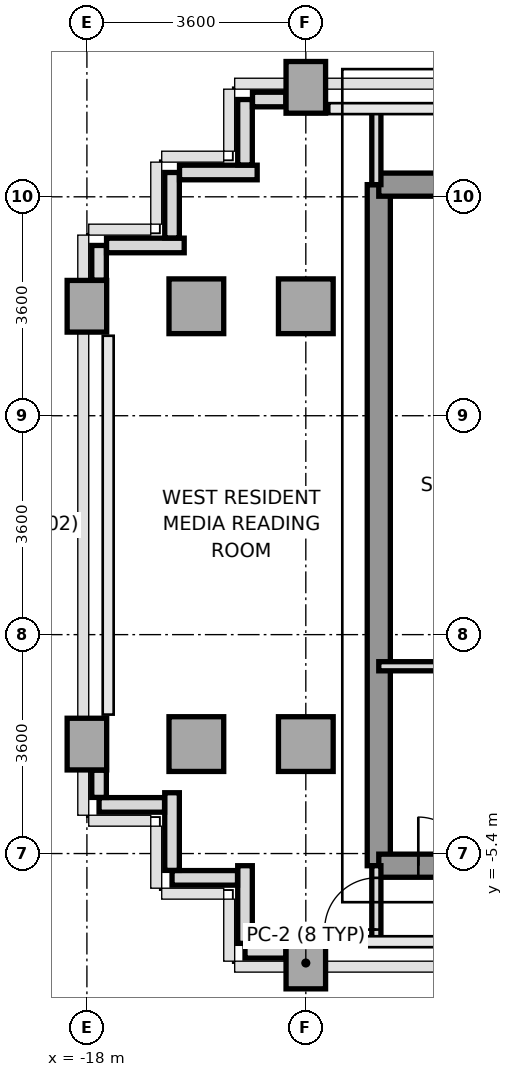
"""IFC4 building model, lengths in metres.
Left out: names, types, materials, properties, quantities, classifications, styles, units other than length and angle.
Written with IfcOpenShell. Run it as: python <this file> out.ifc"""

import sys

from ifc_helpers import new_model, si_unit, direction, frame, frame_2d, origin, origin_2d, place, context, subcontext, project, spatial, rectangle, extrude, source, transform, mapped, element, fill, save


model = new_model("IFC4")
c1 = context("Model", 3, precision=1e-05, world=origin(), true_north=direction((0.0, 1.0)))
c2 = subcontext(c1, "Body", "Model", "MODEL_VIEW")
j1 = project(units=[si_unit("LENGTHUNIT", "METRE"), si_unit("PLANEANGLEUNIT", "RADIAN")], contexts=[c1])
p1 = place(None, origin())
s1 = spatial("IfcSite", under=j1, at=p1, CompositionType="ELEMENT")
p2 = place(p1, origin())
s2 = spatial("IfcBuilding", under=s1, at=p2, CompositionType="ELEMENT")
p3 = place(p2, frame((0.0, 0.0, 208.0)))
s3 = spatial("IfcBuildingStorey", under=s2, at=p3, CompositionType="ELEMENT", Elevation=208.0)
m1 = source(origin(), c2, "Body", "SweptSolid", [
    extrude(rectangle(XDim=0.65, YDim=0.85, at=origin_2d()), origin(), (0.0, 0.0, 1.0), 3.2),
])
for number, where, z_axis, x_axis in (
    (1, (-18.0, -3.6, 0.0), (0.0, 0.0, 1.0), (1.0, 0.0, 0.0)),
    (2, (-18.0, 3.6, 0.0), (0.0, 0.0, 1.0), (1.0, 0.0, 0.0)),
):
    element("IfcColumn", number, at=place(p3, frame(where, z_axis=z_axis, x_axis=x_axis)), inside=s3, PredefinedType="COLUMN", context=c2, shape_type="MappedRepresentation", body=[
        mapped(m1, transform((0.0, 0.0, 0.0), x_axis=(1.0, 0.0, 0.0), y_axis=(0.0, 1.0, 0.0), z_axis=(0.0, 0.0, 1.0), scale=1.0)),
    ])
m2 = source(origin(), c2, "Body", "SweptSolid", [
    extrude(rectangle(XDim=0.9, YDim=0.9, at=origin_2d()), origin(), (0.0, 0.0, 1.0), 3.2),
])
for number, where, z_axis, x_axis in (
    (3, (-16.2, -3.6, 0.0), (0.0, 0.0, 1.0), (1.0, 0.0, 0.0)),
    (4, (-16.2, 3.6, 0.0), (0.0, 0.0, 1.0), (1.0, 0.0, 0.0)),
):
    element("IfcColumn", number, at=place(p3, frame(where, z_axis=z_axis, x_axis=x_axis)), inside=s3, PredefinedType="COLUMN", context=c2, shape_type="MappedRepresentation", body=[
        mapped(m2, transform((0.0, 0.0, 0.0), x_axis=(1.0, 0.0, 0.0), y_axis=(0.0, 1.0, 0.0), z_axis=(0.0, 0.0, 1.0), scale=1.0)),
    ])
p4 = place(p3, frame((-14.4, -7.2, 0.0), z_axis=(0.0, 0.0, 1.0), x_axis=(1.0, 0.0, 0.0)))
e5 = element("IfcColumn", 5, at=p4, inside=s3, PredefinedType="COLUMN", context=c2, shape_type="MappedRepresentation", body=[
    mapped(m1, transform((0.0, 0.0, 0.0), x_axis=(1.0, 0.0, 0.0), y_axis=(0.0, 1.0, 0.0), z_axis=(0.0, 0.0, 1.0), scale=1.0)),
])
for number, where, z_axis, x_axis in (
    (6, (-14.4, -3.6, 0.0), (0.0, 0.0, 1.0), (1.0, 0.0, 0.0)),
    (7, (-14.4, 3.6, 0.0), (0.0, 0.0, 1.0), (1.0, 0.0, 0.0)),
):
    element("IfcColumn", number, at=place(p3, frame(where, z_axis=z_axis, x_axis=x_axis)), inside=s3, PredefinedType="COLUMN", context=c2, shape_type="MappedRepresentation", body=[
        mapped(m2, transform((0.0, 0.0, 0.0), x_axis=(1.0, 0.0, 0.0), y_axis=(0.0, 1.0, 0.0), z_axis=(0.0, 0.0, 1.0), scale=1.0)),
    ])
p5 = place(p3, frame((-14.4, 7.2, 0.0), z_axis=(0.0, 0.0, 1.0), x_axis=(1.0, 0.0, 0.0)))
e8 = element("IfcColumn", 8, at=p5, inside=s3, PredefinedType="COLUMN", context=c2, shape_type="MappedRepresentation", body=[
    mapped(m1, transform((0.0, 0.0, 0.0), x_axis=(1.0, 0.0, 0.0), y_axis=(0.0, 1.0, 0.0), z_axis=(0.0, 0.0, 1.0), scale=1.0)),
])
p6 = place(p3, frame((-14.728, -7.0, 0.0), z_axis=(0.0, 0.0, 1.0), x_axis=(-1.0, 0.0, 0.0)))
e9 = element("IfcWall", 9, at=p6, inside=s3, PredefinedType="PARAPET", context=c2, shape_type="SweptSolid", body=[
    extrude(rectangle(XDim=0.672, YDim=0.24, at=frame_2d((0.336, 0.0))), origin(), (0.0, 0.0, 1.0), 1.15),
])
p7 = place(p3, frame((-15.4, -6.877, 0.0), z_axis=(0.0, 0.0, 1.0), x_axis=(0.0, 1.0, 0.0)))
e10 = element("IfcWall", 10, at=p7, inside=s3, PredefinedType="PARAPET", context=c2, shape_type="SweptSolid", body=[
    extrude(rectangle(XDim=1.277, YDim=0.24, at=frame_2d((0.638, 0.0))), origin(), (0.0, 0.0, 1.0), 1.15),
])
p8 = place(p3, frame((-15.523, -5.8, 0.0), z_axis=(0.0, 0.0, 1.0), x_axis=(-1.0, 0.0, 0.0)))
e11 = element("IfcWall", 11, at=p8, inside=s3, PredefinedType="PARAPET", context=c2, shape_type="SweptSolid", body=[
    extrude(rectangle(XDim=1.077, YDim=0.24, at=frame_2d((0.539, 0.0))), origin(), (0.0, 0.0, 1.0), 1.15),
])
p9 = place(p3, frame((-16.6, -5.677, 0.0), z_axis=(0.0, 0.0, 1.0), x_axis=(0.0, 1.0, 0.0)))
e12 = element("IfcWall", 12, at=p9, inside=s3, PredefinedType="PARAPET", context=c2, shape_type="SweptSolid", body=[
    extrude(rectangle(XDim=1.277, YDim=0.24, at=frame_2d((0.639, 0.0))), origin(), (0.0, 0.0, 1.0), 1.15),
])
p10 = place(p3, frame((-16.723, -4.6, 0.0), z_axis=(0.0, 0.0, 1.0), x_axis=(-1.0, 0.0, 0.0)))
e13 = element("IfcWall", 13, at=p10, inside=s3, PredefinedType="PARAPET", context=c2, shape_type="SweptSolid", body=[
    extrude(rectangle(XDim=1.077, YDim=0.24, at=frame_2d((0.539, 0.0))), origin(), (0.0, 0.0, 1.0), 1.15),
])
p11 = place(p3, frame((-17.8, -4.477, 0.0), z_axis=(0.0, 0.0, 1.0), x_axis=(0.0, 1.0, 0.0)))
e14 = element("IfcWall", 14, at=p11, inside=s3, PredefinedType="PARAPET", context=c2, shape_type="SweptSolid", body=[
    extrude(rectangle(XDim=0.449, YDim=0.24, at=frame_2d((0.225, 0.0))), origin(), (0.0, 0.0, 1.0), 1.15),
])
p12 = place(p3, frame((-17.8, 4.028, 0.0), z_axis=(0.0, 0.0, 1.0), x_axis=(0.0, 1.0, 0.0)))
e15 = element("IfcWall", 15, at=p12, inside=s3, PredefinedType="PARAPET", context=c2, shape_type="SweptSolid", body=[
    extrude(rectangle(XDim=0.572, YDim=0.24, at=frame_2d((0.286, 0.0))), origin(), (0.0, 0.0, 1.0), 1.15),
])
p13 = place(p3, frame((-17.677, 4.6, 0.0), z_axis=(0.0, 0.0, 1.0), x_axis=(1.0, 0.0, 0.0)))
e16 = element("IfcWall", 16, at=p13, inside=s3, PredefinedType="PARAPET", context=c2, shape_type="SweptSolid", body=[
    extrude(rectangle(XDim=1.277, YDim=0.24, at=frame_2d((0.639, 0.0))), origin(), (0.0, 0.0, 1.0), 1.15),
])
p14 = place(p3, frame((-16.6, 4.723, 0.0), z_axis=(0.0, 0.0, 1.0), x_axis=(0.0, 1.0, 0.0)))
e17 = element("IfcWall", 17, at=p14, inside=s3, PredefinedType="PARAPET", context=c2, shape_type="SweptSolid", body=[
    extrude(rectangle(XDim=1.077, YDim=0.24, at=frame_2d((0.539, 0.0))), origin(), (0.0, 0.0, 1.0), 1.15),
])
p15 = place(p3, frame((-16.477, 5.8, 0.0), z_axis=(0.0, 0.0, 1.0), x_axis=(1.0, 0.0, 0.0)))
e18 = element("IfcWall", 18, at=p15, inside=s3, PredefinedType="PARAPET", context=c2, shape_type="SweptSolid", body=[
    extrude(rectangle(XDim=1.277, YDim=0.24, at=frame_2d((0.639, 0.0))), origin(), (0.0, 0.0, 1.0), 1.15),
])
p16 = place(p3, frame((-15.4, 5.923, 0.0), z_axis=(0.0, 0.0, 1.0), x_axis=(0.0, 1.0, 0.0)))
e19 = element("IfcWall", 19, at=p16, inside=s3, PredefinedType="PARAPET", context=c2, shape_type="SweptSolid", body=[
    extrude(rectangle(XDim=1.077, YDim=0.24, at=frame_2d((0.539, 0.0))), origin(), (0.0, 0.0, 1.0), 1.15),
])
p17 = place(p3, frame((-15.277, 7.0, 0.0), z_axis=(0.0, 0.0, 1.0), x_axis=(1.0, 0.0, 0.0)))
e20 = element("IfcWall", 20, at=p17, inside=s3, PredefinedType="PARAPET", context=c2, shape_type="SweptSolid", body=[
    extrude(rectangle(XDim=0.549, YDim=0.24, at=frame_2d((0.274, 0.0))), origin(), (0.0, 0.0, 1.0), 1.15),
])
p18 = place(p3, frame((-13.2, -5.6, 0.0), z_axis=(0.0, 0.0, 1.0), x_axis=(0.0, 1.0, 0.0)))
e21 = element("IfcWall", 21, at=p18, inside=s3, PredefinedType="SHEAR", context=c2, shape_type="SweptSolid", body=[
    extrude(rectangle(XDim=11.2, YDim=0.38, at=frame_2d((5.6, 0.0))), origin(), (0.0, 0.0, 1.0), 3.2),
])
p19 = place(p3, frame((-13.2, 5.6, 0.0), z_axis=(0.0, 0.0, 1.0), x_axis=(1.0, 0.0, 0.0)))
e22 = element("IfcWall", 22, at=p19, inside=s3, PredefinedType="SHEAR", context=c2, shape_type="SweptSolid", body=[
    extrude(rectangle(XDim=1.844, YDim=0.38, at=frame_2d((0.922, 0.0))), origin(), (0.0, 0.0, 1.0), 3.2),
])
p20 = place(p3, frame((-13.2, -5.6, 0.0), z_axis=(0.0, 0.0, 1.0), x_axis=(1.0, 0.0, 0.0)))
e23 = element("IfcWall", 23, at=p20, inside=s3, PredefinedType="SHEAR", context=c2, shape_type="SweptSolid", body=[
    extrude(rectangle(XDim=7.8, YDim=0.38, at=frame_2d((3.9, 0.0))), origin(), (0.0, 0.0, 1.0), 3.2),
])
p21 = place(p20, frame((0.65, 0.0, 0.0)))
e24 = element("IfcOpeningElement", 24, at=p21, cuts=e23, PredefinedType="OPENING", context=c2, shape_type="SweptSolid", body=[
    extrude(rectangle(XDim=0.8, YDim=2.1, at=frame_2d((0.4, 1.05))), frame((0.0, 0.2, 0.0), z_axis=(0.0, -1.0, 0.0), x_axis=(1.0, 0.0, 0.0)), (0.0, 0.0, 1.0), 0.4),
])
p22 = place(p20, frame((4.2, 0.0, 0.0)))
e25 = element("IfcOpeningElement", 25, at=p22, cuts=e23, PredefinedType="OPENING", context=c2, shape_type="SweptSolid", body=[
    extrude(rectangle(XDim=0.95, YDim=2.15, at=frame_2d((0.475, 1.075))), frame((0.0, 0.2, 0.0), z_axis=(0.0, -1.0, 0.0), x_axis=(1.0, 0.0, 0.0)), (0.0, 0.0, 1.0), 0.4),
])
p23 = place(p3, frame((-13.2, -2.32, 0.0), z_axis=(0.0, 0.0, 1.0), x_axis=(1.0, 0.0, 0.0)))
e26 = element("IfcWall", 26, at=p23, inside=s3, PredefinedType="PARTITIONING", context=c2, shape_type="SweptSolid", body=[
    extrude(rectangle(XDim=2.18, YDim=0.15, at=frame_2d((1.09, 0.0))), origin(), (0.0, 0.0, 1.0), 3.2),
])
p24 = place(p3, frame((-13.24, 5.6, 0.0), z_axis=(0.0, 0.0, 1.0), x_axis=(0.0, 1.0, 0.0)))
e27 = element("IfcWall", 27, at=p24, inside=s3, PredefinedType="PARTITIONING", context=c2, shape_type="SweptSolid", body=[
    extrude(rectangle(XDim=1.25, YDim=0.15, at=frame_2d((0.625, 0.0))), origin(), (0.0, 0.0, 1.0), 3.2),
])
p25 = place(p3, frame((-13.24, -6.85, 0.0), z_axis=(0.0, 0.0, 1.0), x_axis=(0.0, 1.0, 0.0)))
e28 = element("IfcWall", 28, at=p25, inside=s3, PredefinedType="PARTITIONING", context=c2, shape_type="SweptSolid", body=[
    extrude(rectangle(XDim=1.25, YDim=0.15, at=frame_2d((0.625, 0.0))), origin(), (0.0, 0.0, 1.0), 3.2),
])
p26 = place(p25, frame((0.2, 0.0, 0.0)))
e29 = element("IfcOpeningElement", 29, at=p26, cuts=e28, PredefinedType="OPENING", context=c2, shape_type="SweptSolid", body=[
    extrude(rectangle(XDim=0.85, YDim=2.1, at=frame_2d((0.425, 1.05))), frame((0.0, 0.085, 0.0), z_axis=(0.0, -1.0, 0.0), x_axis=(1.0, 0.0, 0.0)), (0.0, 0.0, 1.0), 0.17),
])
m3 = source(origin(), c2, "Body", "SweptSolid", [
    extrude(rectangle(XDim=0.8, YDim=2.1, at=frame_2d((0.4, 1.05))), frame((0.0, 0.025, 0.0), z_axis=(0.0, -1.0, 0.0), x_axis=(1.0, 0.0, 0.0)), (0.0, 0.0, 1.0), 0.05),
])
p27 = place(p21, origin())
e30 = element("IfcDoor", 30, at=p27, inside=s3, OperationType="SINGLE_SWING_LEFT", PredefinedType="DOOR", context=c2, shape_type="MappedRepresentation", body=[
    mapped(m3, transform((0.0, 0.0, 0.0), x_axis=(1.0, 0.0, 0.0), y_axis=(0.0, 1.0, 0.0), z_axis=(0.0, 0.0, 1.0), scale=1.0)),
])
fill(e24, e30)
m4 = source(origin(), c2, "Body", "SweptSolid", [
    extrude(rectangle(XDim=0.85, YDim=2.1, at=frame_2d((0.425, 1.05))), frame((0.0, 0.025, 0.0), z_axis=(0.0, -1.0, 0.0), x_axis=(1.0, 0.0, 0.0)), (0.0, 0.0, 1.0), 0.05),
])
p28 = place(p26, origin())
e31 = element("IfcDoor", 31, at=p28, inside=s3, OperationType="SINGLE_SWING_LEFT", PredefinedType="DOOR", context=c2, shape_type="MappedRepresentation", body=[
    mapped(m4, transform((0.0, 0.0, 0.0), x_axis=(1.0, 0.0, 0.0), y_axis=(0.0, 1.0, 0.0), z_axis=(0.0, 0.0, 1.0), scale=1.0)),
])
fill(e29, e31)
save(model, sys.argv[1])
